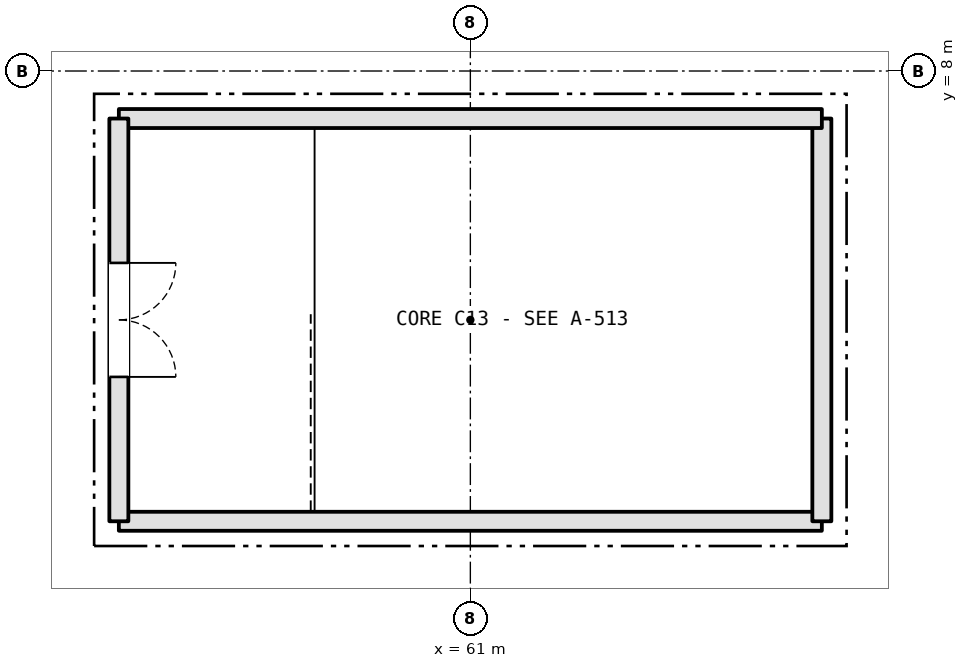
"""IFC4 building model, lengths in metres.
Left out: names, types, materials, properties, quantities, classifications, styles, units other than length and angle.
Written with IfcOpenShell. Run it as: python <this file> out.ifc"""

import sys

from ifc_helpers import new_model, si_unit, direction, frame, frame_2d, origin, place, context, subcontext, project, spatial, rectangle, extrude, element, fill, save


model = new_model("IFC4")
c1 = context("Model", 3, precision=1e-05, world=origin(), true_north=direction((0.0, 1.0)))
c2 = subcontext(c1, "Body", "Model", "MODEL_VIEW")
j1 = project(units=[si_unit("LENGTHUNIT", "METRE"), si_unit("PLANEANGLEUNIT", "RADIAN")], contexts=[c1])
p1 = place(None, origin())
s1 = spatial("IfcSite", under=j1, at=p1, CompositionType="ELEMENT")
p2 = place(p1, origin())
s2 = spatial("IfcBuilding", under=s1, at=p2, CompositionType="ELEMENT")
p3 = place(p2, frame((0.0, 0.0, 21.6)))
s3 = spatial("IfcBuildingStorey", under=s2, at=p3, CompositionType="ELEMENT", Elevation=21.6)
p4 = place(p3, frame((56.375, 2.075, 0.0), z_axis=(0.0, 0.0, 1.0), x_axis=(1.0, 0.0, 0.0)))
e1 = element("IfcWall", 1, at=p4, inside=s3, PredefinedType="SHEAR", context=c2, shape_type="SweptSolid", body=[
    extrude(rectangle(XDim=9.249, YDim=0.25, at=frame_2d((4.625, 0.0))), origin(), (0.0, 0.0, 1.0), 5.15),
])
p5 = place(p3, frame((65.625, 2.075, 0.0), z_axis=(0.0, 0.0, 1.0), x_axis=(0.0, 1.0, 0.0)))
e2 = element("IfcWall", 2, at=p5, inside=s3, PredefinedType="SHEAR", context=c2, shape_type="SweptSolid", body=[
    extrude(rectangle(XDim=5.299, YDim=0.25, at=frame_2d((2.649, 0.0))), origin(), (0.0, 0.0, 1.0), 5.15),
])
p6 = place(p3, frame((65.625, 7.375, 0.0), z_axis=(0.0, 0.0, 1.0), x_axis=(-1.0, 0.0, 0.0)))
e3 = element("IfcWall", 3, at=p6, inside=s3, PredefinedType="SHEAR", context=c2, shape_type="SweptSolid", body=[
    extrude(rectangle(XDim=9.249, YDim=0.25, at=frame_2d((4.625, 0.0))), origin(), (0.0, 0.0, 1.0), 5.15),
])
p7 = place(p3, frame((56.375, 7.375, 0.0), z_axis=(0.0, 0.0, 1.0), x_axis=(0.0, -1.0, 0.0)))
e4 = element("IfcWall", 4, at=p7, inside=s3, PredefinedType="SHEAR", context=c2, shape_type="SweptSolid", body=[
    extrude(rectangle(XDim=5.299, YDim=0.25, at=frame_2d((2.649, 0.0))), origin(), (0.0, 0.0, 1.0), 5.15),
])
p8 = place(p7, frame((1.9, 0.0, 0.0)))
e5 = element("IfcOpeningElement", 5, at=p8, cuts=e4, PredefinedType="OPENING", context=c2, shape_type="SweptSolid", body=[
    extrude(rectangle(XDim=1.5, YDim=2.2, at=frame_2d((0.75, 1.1))), frame((0.0, 0.135, 0.0), z_axis=(0.0, -1.0, 0.0), x_axis=(1.0, 0.0, 0.0)), (0.0, 0.0, 1.0), 0.27),
])
p9 = place(p8, origin())
e6 = element("IfcDoor", 6, at=p9, inside=s3, OperationType="DOUBLE_DOOR_SINGLE_SWING", PredefinedType="DOOR", context=c2, shape_type="SweptSolid", body=[
    extrude(rectangle(XDim=1.5, YDim=2.2, at=frame_2d((0.75, 1.1))), frame((0.0, 0.025, 0.0), z_axis=(0.0, -1.0, 0.0), x_axis=(1.0, 0.0, 0.0)), (0.0, 0.0, 1.0), 0.05),
])
fill(e5, e6)
save(model, sys.argv[1])
